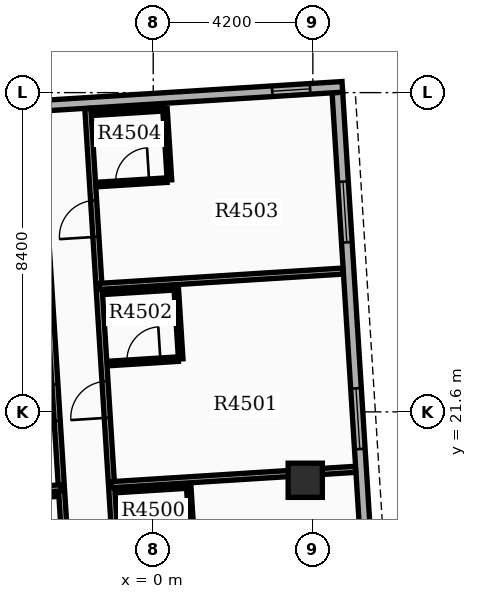
"""IFC4 building model, lengths in metres.
Left out: names, types, materials, properties, quantities, classifications, styles, units other than length and angle.
Written with IfcOpenShell. Run it as: python <this file> out.ifc"""

import sys

from ifc_helpers import new_model, si_unit, direction, frame, frame_2d, origin, origin_2d, place, context, subcontext, project, spatial, rectangle, circle, extrude, element, fill, save


model = new_model("IFC4")
c1 = context("Model", 3, precision=1e-05, world=origin(), true_north=direction((0.0, 1.0)))
c2 = subcontext(c1, "Body", "Model", "MODEL_VIEW")
j1 = project(units=[si_unit("LENGTHUNIT", "METRE"), si_unit("PLANEANGLEUNIT", "RADIAN")], contexts=[c1])
p1 = place(None, origin())
s1 = spatial("IfcSite", under=j1, at=p1, CompositionType="ELEMENT")
p2 = place(p1, origin())
s2 = spatial("IfcBuilding", under=s1, at=p2, CompositionType="ELEMENT")
p3 = place(p2, frame((0.0, 0.0, 281.1)))
s3 = spatial("IfcBuildingStorey", under=s2, at=p3, CompositionType="ELEMENT", Elevation=281.1)
p4 = place(p3, frame((4.0, 19.8, 0.0), z_axis=(0.0, 0.0, 1.0), x_axis=(1.0, 0.0, 0.0)))
e1 = element("IfcColumn", 1, at=p4, inside=s3, PredefinedType="COLUMN", context=c2, shape_type="SweptSolid", body=[
    extrude(circle(Radius=0.45, at=origin_2d()), origin(), (0.0, 0.0, 1.0), 3.9),
])
p5 = place(p3, frame((5.769, 15.333, 0.0), z_axis=(0.0, 0.0, 1.0), x_axis=(-0.062779465852, 0.998027423805, 0.0)))
e2 = element("IfcWall", 2, at=p5, inside=s3, PredefinedType="STANDARD", context=c2, shape_type="SweptSolid", body=[
    extrude(rectangle(XDim=14.7, YDim=0.28, at=frame_2d((7.35, 0.0))), origin(), (0.0, 0.0, 1.0), 3.18),
])
p6 = place(p5, frame((0.85, 0.0, 0.8)))
e3 = element("IfcOpeningElement", 3, at=p6, cuts=e2, PredefinedType="OPENING", context=c2, shape_type="SweptSolid", body=[
    extrude(rectangle(XDim=1.6, YDim=1.7, at=frame_2d((0.8, 0.85))), frame((0.0, 0.15, 0.0), z_axis=(0.0, -1.0, 0.0), x_axis=(1.0, 0.0, 0.0)), (0.0, 0.0, 1.0), 0.3),
])
p7 = place(p5, frame((5.3, 0.0, 0.8)))
e4 = element("IfcOpeningElement", 4, at=p7, cuts=e2, PredefinedType="OPENING", context=c2, shape_type="SweptSolid", body=[
    extrude(rectangle(XDim=1.6, YDim=1.7, at=frame_2d((0.8, 0.85))), frame((0.0, 0.15, 0.0), z_axis=(0.0, -1.0, 0.0), x_axis=(1.0, 0.0, 0.0)), (0.0, 0.0, 1.0), 0.3),
])
p8 = place(p5, frame((10.75, 0.0, 0.8)))
e5 = element("IfcOpeningElement", 5, at=p8, cuts=e2, PredefinedType="OPENING", context=c2, shape_type="SweptSolid", body=[
    extrude(rectangle(XDim=1.6, YDim=1.7, at=frame_2d((0.8, 0.85))), frame((0.0, 0.15, 0.0), z_axis=(0.0, -1.0, 0.0), x_axis=(1.0, 0.0, 0.0)), (0.0, 0.0, 1.0), 0.3),
])
p9 = place(p3, frame((4.977, 30.152, 0.0), z_axis=(0.0, 0.0, 1.0), x_axis=(-0.998026318072, -0.062797041623, 0.0)))
e6 = element("IfcWall", 6, at=p9, inside=s3, PredefinedType="STANDARD", context=c2, shape_type="SweptSolid", body=[
    extrude(rectangle(XDim=13.72, YDim=0.28, at=frame_2d((6.86, 0.0))), origin(), (0.0, 0.0, 1.0), 3.18),
])
p10 = place(p9, frame((0.85, 0.0, 0.85)))
e7 = element("IfcOpeningElement", 7, at=p10, cuts=e6, PredefinedType="OPENING", context=c2, shape_type="SweptSolid", body=[
    extrude(rectangle(XDim=1.0, YDim=1.5, at=frame_2d((0.5, 0.75))), frame((0.0, 0.15, 0.0), z_axis=(0.0, -1.0, 0.0), x_axis=(1.0, 0.0, 0.0)), (0.0, 0.0, 1.0), 0.3),
])
p11 = place(p3, frame((-0.778, 14.6, 0.0), z_axis=(0.0, 0.0, 1.0), x_axis=(-0.062791373209, 0.998026674719, 0.0)))
e8 = element("IfcWall", 8, at=p11, inside=s3, PredefinedType="PARTITIONING", context=c2, shape_type="SweptSolid", body=[
    extrude(rectangle(XDim=15.012, YDim=0.16, at=frame_2d((7.506, 0.0))), origin(), (0.0, 0.0, 1.0), 3.17),
])
p12 = place(p11, frame((1.122, 0.0, 0.0)))
e9 = element("IfcOpeningElement", 9, at=p12, cuts=e8, PredefinedType="OPENING", context=c2, shape_type="SweptSolid", body=[
    extrude(rectangle(XDim=0.96, YDim=2.15, at=frame_2d((0.48, 1.075))), frame((0.0, 0.09, 0.0), z_axis=(0.0, -1.0, 0.0), x_axis=(1.0, 0.0, 0.0)), (0.0, 0.0, 1.0), 0.18),
])
p13 = place(p11, frame((6.858, 0.0, 0.0)))
e10 = element("IfcOpeningElement", 10, at=p13, cuts=e8, PredefinedType="OPENING", context=c2, shape_type="SweptSolid", body=[
    extrude(rectangle(XDim=0.96, YDim=2.15, at=frame_2d((0.48, 1.075))), frame((0.0, 0.09, 0.0), z_axis=(0.0, -1.0, 0.0), x_axis=(1.0, 0.0, 0.0)), (0.0, 0.0, 1.0), 0.18),
])
p14 = place(p11, frame((11.628, 0.0, 0.0)))
e11 = element("IfcOpeningElement", 11, at=p14, cuts=e8, PredefinedType="OPENING", context=c2, shape_type="SweptSolid", body=[
    extrude(rectangle(XDim=0.96, YDim=2.15, at=frame_2d((0.48, 1.075))), frame((0.0, 0.09, 0.0), z_axis=(0.0, -1.0, 0.0), x_axis=(1.0, 0.0, 0.0)), (0.0, 0.0, 1.0), 0.18),
])
p15 = place(p3, frame((-1.098, 19.684, 0.0), z_axis=(0.0, 0.0, 1.0), x_axis=(0.998024861541, 0.062820185823, 0.0)))
e12 = element("IfcWall", 12, at=p15, inside=s3, PredefinedType="PARTITIONING", context=c2, shape_type="SweptSolid", body=[
    extrude(rectangle(XDim=6.432, YDim=0.16, at=frame_2d((3.216, 0.0))), origin(), (0.0, 0.0, 1.0), 3.17),
])
p16 = place(p3, frame((-0.948, 19.533, 0.0), z_axis=(0.0, 0.0, 1.0), x_axis=(0.998027972529, 0.062770741989, 0.0)))
e13 = element("IfcWall", 13, at=p16, inside=s3, PredefinedType="PARTITIONING", context=c2, shape_type="SweptSolid", body=[
    extrude(rectangle(XDim=1.82, YDim=0.12, at=frame_2d((0.91, 0.0))), origin(), (0.0, 0.0, 1.0), 3.17),
])
p17 = place(p3, frame((1.051, 17.775, 0.0), z_axis=(0.0, 0.0, 1.0), x_axis=(-0.062855297722, 0.998022650819, 0.0)))
e14 = element("IfcWall", 14, at=p17, inside=s3, PredefinedType="PARTITIONING", context=c2, shape_type="SweptSolid", body=[
    extrude(rectangle(XDim=1.88, YDim=0.12, at=frame_2d((0.94, 0.0))), origin(), (0.0, 0.0, 1.0), 3.17),
])
p18 = place(p3, frame((-1.426, 24.901, 0.0), z_axis=(0.0, 0.0, 1.0), x_axis=(0.998027240637, 0.062782377668, 0.0)))
e15 = element("IfcWall", 15, at=p18, inside=s3, PredefinedType="PARTITIONING", context=c2, shape_type="SweptSolid", body=[
    extrude(rectangle(XDim=6.432, YDim=0.16, at=frame_2d((3.216, 0.0))), origin(), (0.0, 0.0, 1.0), 3.17),
])
p19 = place(p3, frame((-1.158, 22.873, 0.0), z_axis=(0.0, 0.0, 1.0), x_axis=(0.998019030272, 0.062912758763, 0.0)))
e16 = element("IfcWall", 16, at=p19, inside=s3, PredefinedType="PARTITIONING", context=c2, shape_type="SweptSolid", body=[
    extrude(rectangle(XDim=1.82, YDim=0.12, at=frame_2d((0.91, 0.0))), origin(), (0.0, 0.0, 1.0), 3.17),
])
p20 = place(p19, frame((0.47, 0.0, 0.0)))
e17 = element("IfcOpeningElement", 17, at=p20, cuts=e16, PredefinedType="OPENING", context=c2, shape_type="SweptSolid", body=[
    extrude(rectangle(XDim=0.88, YDim=2.1, at=frame_2d((0.44, 1.05))), frame((0.0, 0.07, 0.0), z_axis=(0.0, -1.0, 0.0), x_axis=(1.0, 0.0, 0.0)), (0.0, 0.0, 1.0), 0.14),
])
p21 = place(p3, frame((-1.277, 24.75, 0.0), z_axis=(0.0, 0.0, 1.0), x_axis=(0.998027443946, 0.062779145668, 0.0)))
e18 = element("IfcWall", 18, at=p21, inside=s3, PredefinedType="PARTITIONING", context=c2, shape_type="SweptSolid", body=[
    extrude(rectangle(XDim=1.82, YDim=0.12, at=frame_2d((0.91, 0.0))), origin(), (0.0, 0.0, 1.0), 3.17),
])
p22 = place(p3, frame((0.723, 22.992, 0.0), z_axis=(0.0, 0.0, 1.0), x_axis=(-0.062855297722, 0.998022650819, 0.0)))
e19 = element("IfcWall", 19, at=p22, inside=s3, PredefinedType="PARTITIONING", context=c2, shape_type="SweptSolid", body=[
    extrude(rectangle(XDim=1.88, YDim=0.12, at=frame_2d((0.94, 0.0))), origin(), (0.0, 0.0, 1.0), 3.17),
])
p23 = place(p3, frame((-1.455, 27.583, 0.0), z_axis=(0.0, 0.0, 1.0), x_axis=(0.998019030272, 0.062912758763, 0.0)))
e20 = element("IfcWall", 20, at=p23, inside=s3, PredefinedType="PARTITIONING", context=c2, shape_type="SweptSolid", body=[
    extrude(rectangle(XDim=1.82, YDim=0.12, at=frame_2d((0.91, 0.0))), origin(), (0.0, 0.0, 1.0), 3.17),
])
p24 = place(p23, frame((0.47, 0.0, 0.0)))
e21 = element("IfcOpeningElement", 21, at=p24, cuts=e20, PredefinedType="OPENING", context=c2, shape_type="SweptSolid", body=[
    extrude(rectangle(XDim=0.88, YDim=2.1, at=frame_2d((0.44, 1.05))), frame((0.0, 0.07, 0.0), z_axis=(0.0, -1.0, 0.0), x_axis=(1.0, 0.0, 0.0)), (0.0, 0.0, 1.0), 0.14),
])
p25 = place(p3, frame((-1.573, 29.459, 0.0), z_axis=(0.0, 0.0, 1.0), x_axis=(0.998035839873, 0.062645529196, 0.0)))
e22 = element("IfcWall", 22, at=p25, inside=s3, PredefinedType="PARTITIONING", context=c2, shape_type="SweptSolid", body=[
    extrude(rectangle(XDim=1.82, YDim=0.12, at=frame_2d((0.91, 0.0))), origin(), (0.0, 0.0, 1.0), 3.17),
])
p26 = place(p3, frame((0.427, 27.701, 0.0), z_axis=(0.0, 0.0, 1.0), x_axis=(-0.062855297722, 0.998022650819, 0.0)))
e23 = element("IfcWall", 23, at=p26, inside=s3, PredefinedType="PARTITIONING", context=c2, shape_type="SweptSolid", body=[
    extrude(rectangle(XDim=1.88, YDim=0.12, at=frame_2d((0.94, 0.0))), origin(), (0.0, 0.0, 1.0), 3.17),
])
p27 = place(p3, frame((-2.096, 14.517, 0.0), z_axis=(0.0, 0.0, 1.0), x_axis=(-0.062791373209, 0.998026674719, 0.0)))
e24 = element("IfcWall", 24, at=p27, inside=s3, PredefinedType="PARTITIONING", context=c2, shape_type="SweptSolid", body=[
    extrude(rectangle(XDim=15.012, YDim=0.16, at=frame_2d((7.506, 0.0))), origin(), (0.0, 0.0, 1.0), 3.17),
])
p28 = place(p27, frame((1.122, 0.0, 0.0)))
e25 = element("IfcOpeningElement", 25, at=p28, cuts=e24, PredefinedType="OPENING", context=c2, shape_type="SweptSolid", body=[
    extrude(rectangle(XDim=0.96, YDim=2.15, at=frame_2d((0.48, 1.075))), frame((0.0, 0.09, 0.0), z_axis=(0.0, -1.0, 0.0), x_axis=(1.0, 0.0, 0.0)), (0.0, 0.0, 1.0), 0.18),
])
p29 = place(p27, frame((6.858, 0.0, 0.0)))
e26 = element("IfcOpeningElement", 26, at=p29, cuts=e24, PredefinedType="OPENING", context=c2, shape_type="SweptSolid", body=[
    extrude(rectangle(XDim=0.96, YDim=2.15, at=frame_2d((0.48, 1.075))), frame((0.0, 0.09, 0.0), z_axis=(0.0, -1.0, 0.0), x_axis=(1.0, 0.0, 0.0)), (0.0, 0.0, 1.0), 0.18),
])
p30 = place(p27, frame((11.628, 0.0, 0.0)))
e27 = element("IfcOpeningElement", 27, at=p30, cuts=e24, PredefinedType="OPENING", context=c2, shape_type="SweptSolid", body=[
    extrude(rectangle(XDim=0.96, YDim=2.15, at=frame_2d((0.48, 1.075))), frame((0.0, 0.09, 0.0), z_axis=(0.0, -1.0, 0.0), x_axis=(1.0, 0.0, 0.0)), (0.0, 0.0, 1.0), 0.18),
])
p31 = place(p3, frame((-2.416, 19.601, 0.0), z_axis=(0.0, 0.0, 1.0), x_axis=(-0.998026061844, -0.062801113682, 0.0)))
e28 = element("IfcWall", 28, at=p31, inside=s3, PredefinedType="PARTITIONING", context=c2, shape_type="SweptSolid", body=[
    extrude(rectangle(XDim=5.392, YDim=0.16, at=frame_2d((2.696, 0.0))), origin(), (0.0, 0.0, 1.0), 3.17),
])
p32 = place(p3, frame((-4.362, 19.318, 0.0), z_axis=(0.0, 0.0, 1.0), x_axis=(0.998027443946, 0.062779145668, 0.0)))
e29 = element("IfcWall", 29, at=p32, inside=s3, PredefinedType="PARTITIONING", context=c2, shape_type="SweptSolid", body=[
    extrude(rectangle(XDim=1.82, YDim=0.12, at=frame_2d((0.91, 0.0))), origin(), (0.0, 0.0, 1.0), 3.17),
])
p33 = place(p7, origin())
e30 = element("IfcWindow", 30, at=p33, inside=s3, PartitioningType="SINGLE_PANEL", PredefinedType="WINDOW", context=c2, shape_type="SweptSolid", body=[
    extrude(rectangle(XDim=1.6, YDim=1.7, at=frame_2d((0.8, 0.85))), frame((0.0, 0.03, 0.0), z_axis=(0.0, -1.0, 0.0), x_axis=(1.0, 0.0, 0.0)), (0.0, 0.0, 1.0), 0.06),
])
fill(e4, e30)
p34 = place(p8, origin())
e31 = element("IfcWindow", 31, at=p34, inside=s3, PartitioningType="SINGLE_PANEL", PredefinedType="WINDOW", context=c2, shape_type="SweptSolid", body=[
    extrude(rectangle(XDim=1.6, YDim=1.7, at=frame_2d((0.8, 0.85))), frame((0.0, 0.03, 0.0), z_axis=(0.0, -1.0, 0.0), x_axis=(1.0, 0.0, 0.0)), (0.0, 0.0, 1.0), 0.06),
])
fill(e5, e31)
p35 = place(p10, origin())
e32 = element("IfcWindow", 32, at=p35, inside=s3, PartitioningType="SINGLE_PANEL", PredefinedType="WINDOW", context=c2, shape_type="SweptSolid", body=[
    extrude(rectangle(XDim=1.0, YDim=1.5, at=frame_2d((0.5, 0.75))), frame((0.0, 0.03, 0.0), z_axis=(0.0, -1.0, 0.0), x_axis=(1.0, 0.0, 0.0)), (0.0, 0.0, 1.0), 0.06),
])
fill(e7, e32)
p36 = place(p13, origin())
e33 = element("IfcDoor", 33, at=p36, inside=s3, OperationType="SINGLE_SWING_LEFT", PredefinedType="DOOR", context=c2, shape_type="SweptSolid", body=[
    extrude(rectangle(XDim=0.96, YDim=2.15, at=frame_2d((0.48, 1.075))), frame((0.0, 0.025, 0.0), z_axis=(0.0, -1.0, 0.0), x_axis=(1.0, 0.0, 0.0)), (0.0, 0.0, 1.0), 0.05),
])
fill(e10, e33)
p37 = place(p20, origin())
e34 = element("IfcDoor", 34, at=p37, inside=s3, OperationType="SINGLE_SWING_RIGHT", PredefinedType="DOOR", context=c2, shape_type="SweptSolid", body=[
    extrude(rectangle(XDim=0.88, YDim=2.1, at=frame_2d((0.44, 1.05))), frame((0.0, 0.025, 0.0), z_axis=(0.0, -1.0, 0.0), x_axis=(1.0, 0.0, 0.0)), (0.0, 0.0, 1.0), 0.05),
])
fill(e17, e34)
p38 = place(p14, origin())
e35 = element("IfcDoor", 35, at=p38, inside=s3, OperationType="SINGLE_SWING_LEFT", PredefinedType="DOOR", context=c2, shape_type="SweptSolid", body=[
    extrude(rectangle(XDim=0.96, YDim=2.15, at=frame_2d((0.48, 1.075))), frame((0.0, 0.025, 0.0), z_axis=(0.0, -1.0, 0.0), x_axis=(1.0, 0.0, 0.0)), (0.0, 0.0, 1.0), 0.05),
])
fill(e11, e35)
p39 = place(p24, origin())
e36 = element("IfcDoor", 36, at=p39, inside=s3, OperationType="SINGLE_SWING_RIGHT", PredefinedType="DOOR", context=c2, shape_type="SweptSolid", body=[
    extrude(rectangle(XDim=0.88, YDim=2.1, at=frame_2d((0.44, 1.05))), frame((0.0, 0.025, 0.0), z_axis=(0.0, -1.0, 0.0), x_axis=(1.0, 0.0, 0.0)), (0.0, 0.0, 1.0), 0.05),
])
fill(e21, e36)
p40 = place(p29, origin())
e37 = element("IfcDoor", 37, at=p40, inside=s3, OperationType="SINGLE_SWING_LEFT", PredefinedType="DOOR", context=c2, shape_type="SweptSolid", body=[
    extrude(rectangle(XDim=0.96, YDim=2.15, at=frame_2d((0.48, 1.075))), frame((0.0, 0.025, 0.0), z_axis=(0.0, -1.0, 0.0), x_axis=(1.0, 0.0, 0.0)), (0.0, 0.0, 1.0), 0.05),
])
fill(e26, e37)
save(model, sys.argv[1])
